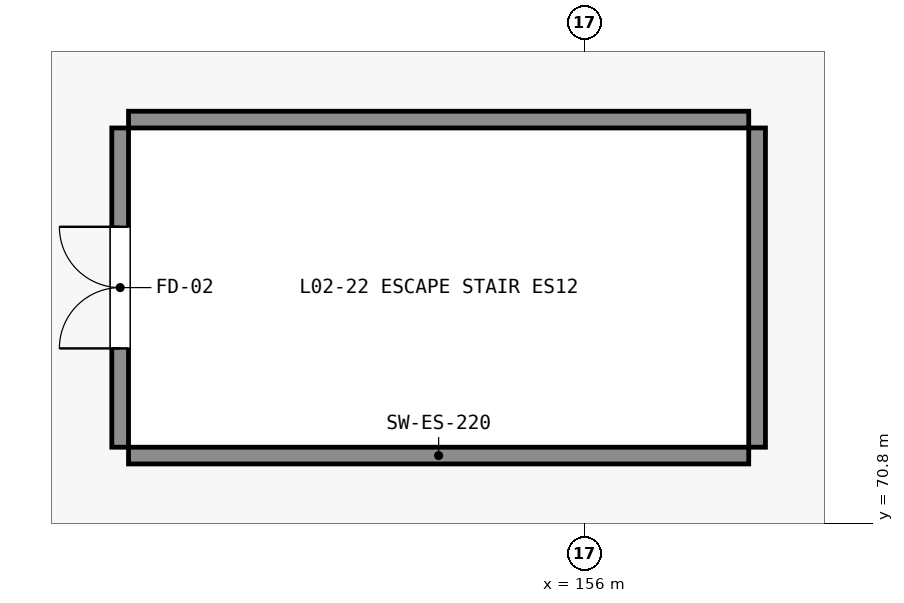
"""IFC4 building model, lengths in metres.
Left out: names, types, materials, properties, quantities, classifications, styles, units other than length and angle.
Written with IfcOpenShell. Run it as: python <this file> out.ifc"""

import sys

from ifc_helpers import new_model, si_unit, direction, frame, frame_2d, origin, place, context, subcontext, project, spatial, rectangle, extrude, element, fill, save


model = new_model("IFC4")
c1 = context("Model", 3, precision=1e-05, world=origin(), true_north=direction((0.0, 1.0)))
c2 = subcontext(c1, "Body", "Model", "MODEL_VIEW")
j1 = project(units=[si_unit("LENGTHUNIT", "METRE"), si_unit("PLANEANGLEUNIT", "RADIAN")], contexts=[c1])
p1 = place(None, origin())
s1 = spatial("IfcSite", under=j1, at=p1, CompositionType="ELEMENT")
p2 = place(p1, origin())
s2 = spatial("IfcBuilding", under=s1, at=p2, CompositionType="ELEMENT")
p3 = place(p2, frame((0.0, 0.0, 11.4)))
s3 = spatial("IfcBuildingStorey", under=s2, at=p3, CompositionType="ELEMENT", Elevation=11.4)
for number, where, z_axis, x_axis in (
    (1, (150.0, 71.69, 0.0), (0.0, 0.0, 1.0), (1.0, 0.0, 0.0)),
    (2, (150.0, 76.11, 0.0), (0.0, 0.0, 1.0), (1.0, 0.0, 0.0)),
):
    element("IfcWall", number, at=place(p3, frame(where, z_axis=z_axis, x_axis=x_axis)), inside=s3, PredefinedType="SHEAR", context=c2, shape_type="SweptSolid", body=[
        extrude(rectangle(XDim=8.16, YDim=0.22, at=frame_2d((4.08, 0.0))), origin(), (0.0, 0.0, 1.0), 4.48),
    ])
p4 = place(p3, frame((149.89, 71.8, 0.0), z_axis=(0.0, 0.0, 1.0), x_axis=(0.0, 1.0, 0.0)))
e3 = element("IfcWall", 3, at=p4, inside=s3, PredefinedType="SHEAR", context=c2, shape_type="SweptSolid", body=[
    extrude(rectangle(XDim=4.2, YDim=0.22, at=frame_2d((2.1, 0.0))), origin(), (0.0, 0.0, 1.0), 4.48),
])
p5 = place(p4, frame((1.3, 0.0, 0.0)))
e4 = element("IfcOpeningElement", 4, at=p5, cuts=e3, PredefinedType="OPENING", context=c2, shape_type="SweptSolid", body=[
    extrude(rectangle(XDim=1.6, YDim=2.2, at=frame_2d((0.8, 1.1))), frame((0.0, 0.12, 0.0), z_axis=(0.0, -1.0, 0.0), x_axis=(1.0, 0.0, 0.0)), (0.0, 0.0, 1.0), 0.24),
])
p6 = place(p3, frame((158.27, 71.8, 0.0), z_axis=(0.0, 0.0, 1.0), x_axis=(0.0, 1.0, 0.0)))
e5 = element("IfcWall", 5, at=p6, inside=s3, PredefinedType="SHEAR", context=c2, shape_type="SweptSolid", body=[
    extrude(rectangle(XDim=4.2, YDim=0.22, at=frame_2d((2.1, 0.0))), origin(), (0.0, 0.0, 1.0), 4.48),
])
p7 = place(p5, origin())
e6 = element("IfcDoor", 6, at=p7, inside=s3, OperationType="DOUBLE_DOOR_SINGLE_SWING", PredefinedType="DOOR", context=c2, shape_type="SweptSolid", body=[
    extrude(rectangle(XDim=1.6, YDim=2.2, at=frame_2d((0.8, 1.1))), frame((0.0, 0.025, 0.0), z_axis=(0.0, -1.0, 0.0), x_axis=(1.0, 0.0, 0.0)), (0.0, 0.0, 1.0), 0.05),
])
fill(e4, e6)
save(model, sys.argv[1])
